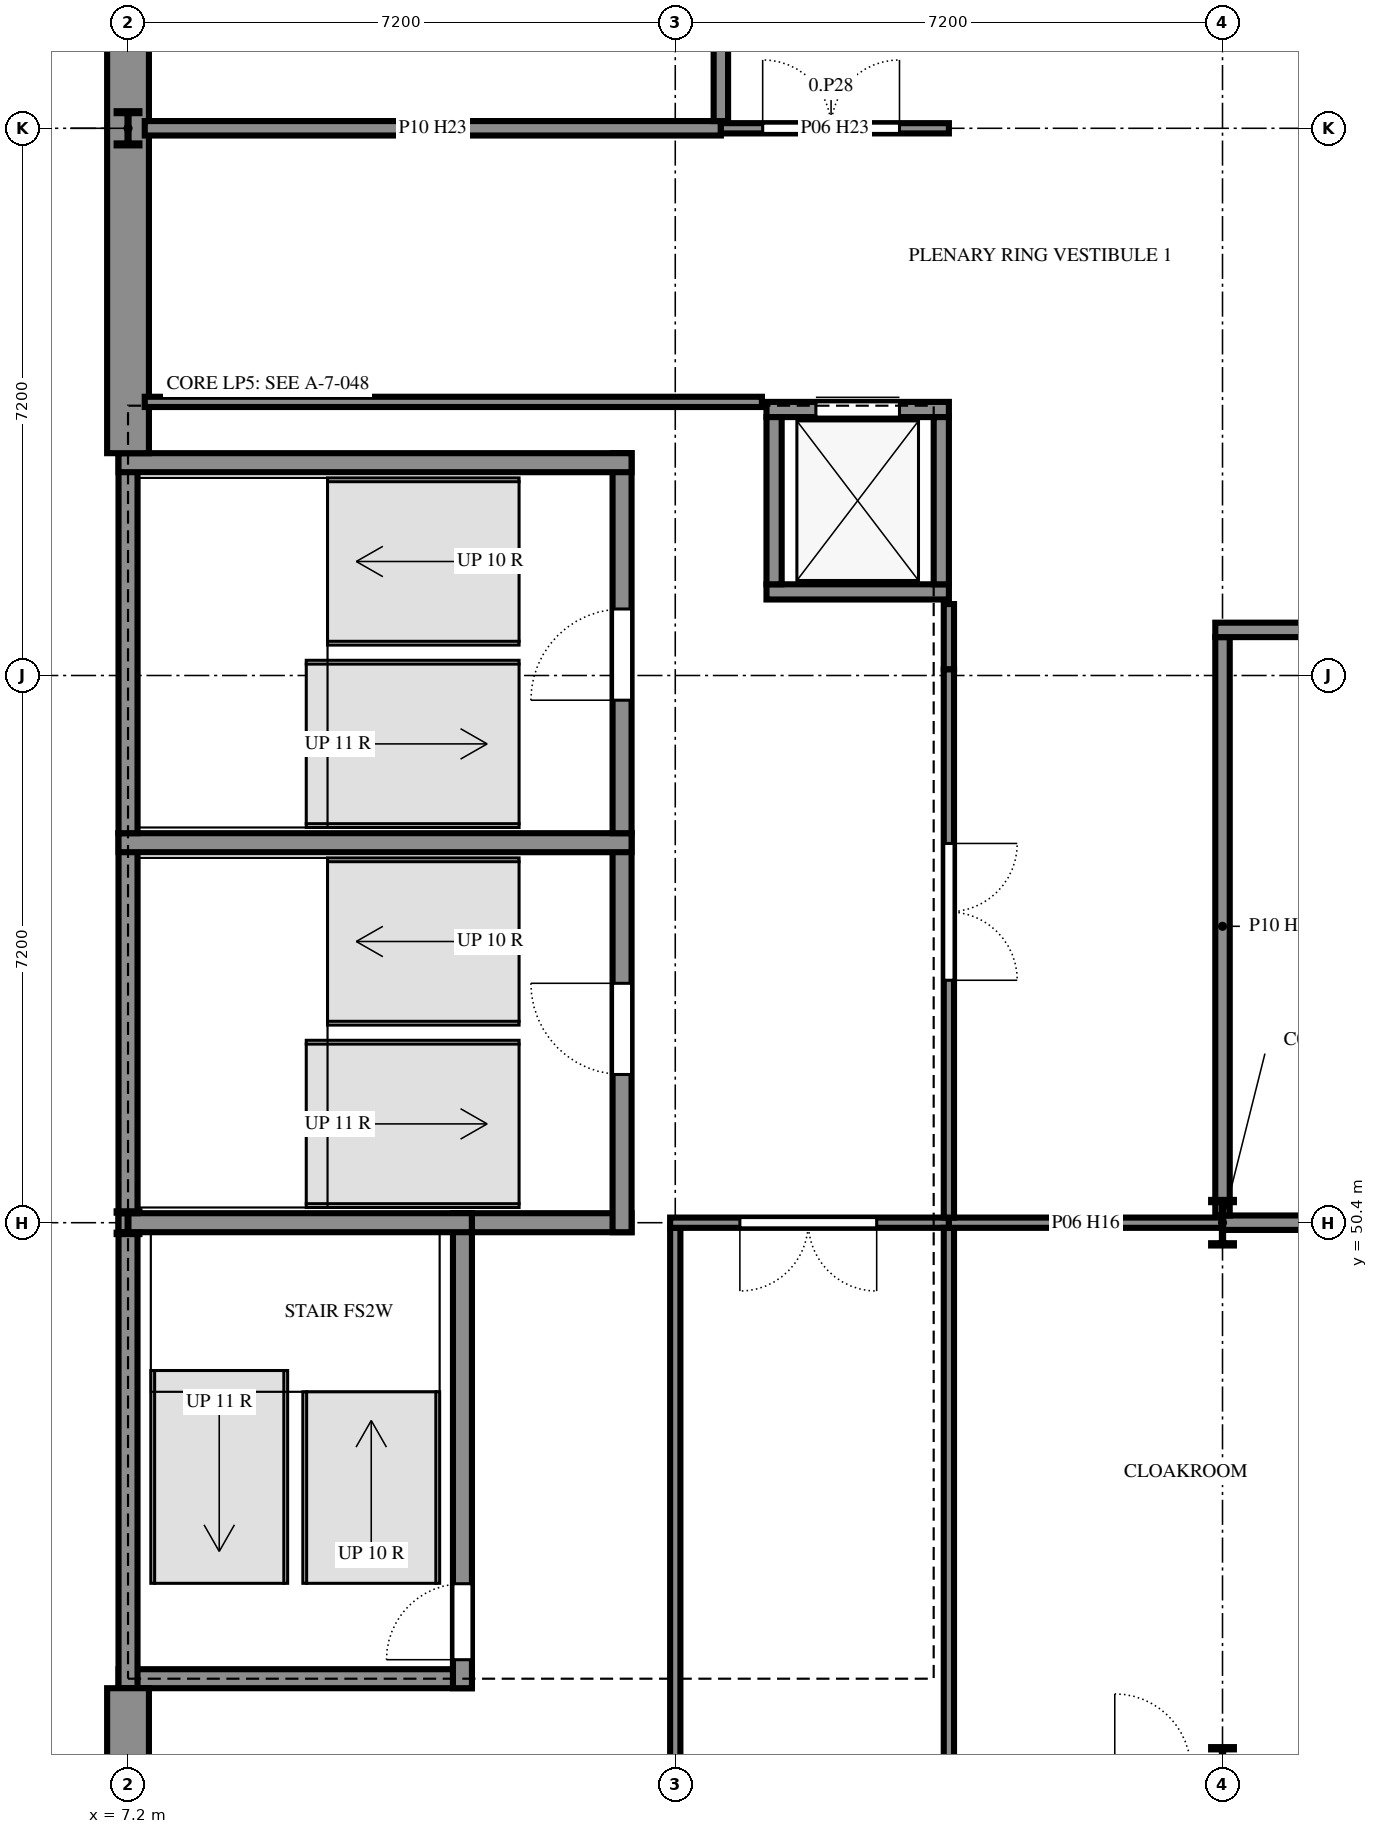
"""IFC4 building model, lengths in metres.
Left out: names, types, materials, properties, quantities, classifications, styles, units other than length and angle.
Written with IfcOpenShell. Run it as: python <this file> out.ifc"""

import sys

from ifc_helpers import new_model, si_unit, direction, frame, frame_2d, origin, origin_2d, place, context, subcontext, project, spatial, rectangle, i_section, extrude, element, fill, save


model = new_model("IFC4")
c1 = context("Model", 3, precision=1e-05, world=origin(), true_north=direction((0.0, 1.0)))
c2 = subcontext(c1, "Body", "Model", "MODEL_VIEW")
j1 = project(units=[si_unit("LENGTHUNIT", "METRE"), si_unit("PLANEANGLEUNIT", "RADIAN")], contexts=[c1])
p1 = place(None, origin())
s1 = spatial("IfcSite", under=j1, at=p1, CompositionType="ELEMENT")
p2 = place(p1, origin())
s2 = spatial("IfcBuilding", under=s1, at=p2, CompositionType="ELEMENT")
p3 = place(p2, origin())
s3 = spatial("IfcBuildingStorey", under=s2, at=p3, CompositionType="ELEMENT", Elevation=0.0)
p4 = place(p3, frame((7.2, 50.4, -0.3), z_axis=(0.0, 0.0, 1.0), x_axis=(1.0, 0.0, 0.0)))
e1 = element("IfcColumn", 1, at=p4, inside=s3, PredefinedType="COLUMN", context=c2, shape_type="SweptSolid", body=[
    extrude(i_section(OverallWidth=0.3, OverallDepth=0.3, WebThickness=0.011, FlangeThickness=0.019, FilletRadius=0.027, at=origin_2d()), origin(), (0.0, 0.0, 1.0), 3.9),
])
for number, where, z_axis, x_axis in (
    (2, (21.6, 43.2, -0.3), (0.0, 0.0, 1.0), (1.0, 0.0, 0.0)),
    (3, (21.6, 50.4, -0.3), (0.0, 0.0, 1.0), (1.0, 0.0, 0.0)),
):
    element("IfcColumn", number, at=place(p3, frame(where, z_axis=z_axis, x_axis=x_axis)), inside=s3, PredefinedType="COLUMN", context=c2, shape_type="SweptSolid", body=[
        extrude(i_section(OverallWidth=0.3, OverallDepth=0.6, WebThickness=0.015, FlangeThickness=0.03, FilletRadius=0.027, at=origin_2d()), origin(), (0.0, 0.0, 1.0), 3.9),
    ])
p5 = place(p3, frame((7.2, 64.8, -0.3), z_axis=(0.0, 0.0, 1.0), x_axis=(1.0, 0.0, 0.0)))
e4 = element("IfcColumn", 4, at=p5, inside=s3, PredefinedType="COLUMN", context=c2, shape_type="SweptSolid", body=[
    extrude(i_section(OverallWidth=0.3, OverallDepth=0.45, WebThickness=0.014, FlangeThickness=0.026, FilletRadius=0.027, at=origin_2d()), origin(), (0.0, 0.0, 1.0), 3.9),
])
p6 = place(p3, frame((7.075, 44.4, 0.0), z_axis=(0.0, 0.0, 1.0), x_axis=(1.0, 0.0, 0.0)))
e5 = element("IfcWall", 5, at=p6, inside=s3, PredefinedType="SHEAR", context=c2, shape_type="SweptSolid", body=[
    extrude(rectangle(XDim=4.65, YDim=0.25, at=frame_2d((2.325, 0.0))), origin(), (0.0, 0.0, 1.0), 3.6),
])
p7 = place(p3, frame((11.6, 44.275, 0.0), z_axis=(0.0, 0.0, 1.0), x_axis=(0.0, 1.0, 0.0)))
e6 = element("IfcWall", 6, at=p7, inside=s3, PredefinedType="SHEAR", context=c2, shape_type="SweptSolid", body=[
    extrude(rectangle(XDim=6.25, YDim=0.25, at=frame_2d((3.125, 0.0))), origin(), (0.0, 0.0, 1.0), 3.6),
])
p8 = place(p7, frame((0.375, 0.0, 0.0)))
e7 = element("IfcOpeningElement", 7, at=p8, cuts=e6, PredefinedType="OPENING", context=c2, shape_type="SweptSolid", body=[
    extrude(rectangle(XDim=1.0, YDim=2.4, at=frame_2d((0.5, 1.2))), frame((0.0, 0.135, 0.0), z_axis=(0.0, -1.0, 0.0), x_axis=(1.0, 0.0, 0.0)), (0.0, 0.0, 1.0), 0.27),
])
p9 = place(p3, frame((7.2, 50.525, 0.0), z_axis=(0.0, 0.0, 1.0), x_axis=(0.0, -1.0, 0.0)))
e8 = element("IfcWall", 8, at=p9, inside=s3, PredefinedType="SHEAR", context=c2, shape_type="SweptSolid", body=[
    extrude(rectangle(XDim=6.25, YDim=0.25, at=frame_2d((3.125, 0.0))), origin(), (0.0, 0.0, 1.0), 3.6),
])
p10 = place(p3, frame((11.725, 50.4, 0.0), z_axis=(0.0, 0.0, 1.0), x_axis=(-1.0, 0.0, 0.0)))
e9 = element("IfcWall", 9, at=p10, inside=s3, PredefinedType="SHEAR", context=c2, shape_type="SweptSolid", body=[
    extrude(rectangle(XDim=4.65, YDim=0.25, at=frame_2d((2.325, 0.0))), origin(), (0.0, 0.0, 1.0), 3.6),
])
p11 = place(p3, frame((11.725, 50.4, 0.0), z_axis=(0.0, 0.0, 1.0), x_axis=(1.0, 0.0, 0.0)))
e10 = element("IfcWall", 10, at=p11, inside=s3, PredefinedType="SHEAR", context=c2, shape_type="SweptSolid", body=[
    extrude(rectangle(XDim=2.1, YDim=0.25, at=frame_2d((1.05, 0.0))), origin(), (0.0, 0.0, 1.0), 3.6),
])
p12 = place(p3, frame((13.7, 50.275, 0.0), z_axis=(0.0, 0.0, 1.0), x_axis=(0.0, 1.0, 0.0)))
e11 = element("IfcWall", 11, at=p12, inside=s3, PredefinedType="SHEAR", context=c2, shape_type="SweptSolid", body=[
    extrude(rectangle(XDim=5.25, YDim=0.25, at=frame_2d((2.625, 0.0))), origin(), (0.0, 0.0, 1.0), 3.6),
])
p13 = place(p12, frame((2.075, 0.0, 0.0)))
e12 = element("IfcOpeningElement", 12, at=p13, cuts=e11, PredefinedType="OPENING", context=c2, shape_type="SweptSolid", body=[
    extrude(rectangle(XDim=1.2, YDim=2.4, at=frame_2d((0.6, 1.2))), frame((0.0, 0.135, 0.0), z_axis=(0.0, -1.0, 0.0), x_axis=(1.0, 0.0, 0.0)), (0.0, 0.0, 1.0), 0.27),
])
p14 = place(p3, frame((7.2, 55.525, 0.0), z_axis=(0.0, 0.0, 1.0), x_axis=(0.0, -1.0, 0.0)))
e13 = element("IfcWall", 13, at=p14, inside=s3, PredefinedType="SHEAR", context=c2, shape_type="SweptSolid", body=[
    extrude(rectangle(XDim=5.0, YDim=0.25, at=frame_2d((2.5, 0.0))), origin(), (0.0, 0.0, 1.0), 3.6),
])
p15 = place(p3, frame((13.825, 55.4, 0.0), z_axis=(0.0, 0.0, 1.0), x_axis=(-1.0, 0.0, 0.0)))
e14 = element("IfcWall", 14, at=p15, inside=s3, PredefinedType="SHEAR", context=c2, shape_type="SweptSolid", body=[
    extrude(rectangle(XDim=6.75, YDim=0.25, at=frame_2d((3.375, 0.0))), origin(), (0.0, 0.0, 1.0), 3.6),
])
p16 = place(p3, frame((13.7, 55.525, 0.0), z_axis=(0.0, 0.0, 1.0), x_axis=(0.0, 1.0, 0.0)))
e15 = element("IfcWall", 15, at=p16, inside=s3, PredefinedType="SHEAR", context=c2, shape_type="SweptSolid", body=[
    extrude(rectangle(XDim=5.0, YDim=0.25, at=frame_2d((2.5, 0.0))), origin(), (0.0, 0.0, 1.0), 3.6),
])
p17 = place(p16, frame((1.75, 0.0, 0.0)))
e16 = element("IfcOpeningElement", 16, at=p17, cuts=e15, PredefinedType="OPENING", context=c2, shape_type="SweptSolid", body=[
    extrude(rectangle(XDim=1.2, YDim=2.4, at=frame_2d((0.6, 1.2))), frame((0.0, 0.135, 0.0), z_axis=(0.0, -1.0, 0.0), x_axis=(1.0, 0.0, 0.0)), (0.0, 0.0, 1.0), 0.27),
])
p18 = place(p3, frame((7.2, 60.525, 0.0), z_axis=(0.0, 0.0, 1.0), x_axis=(0.0, -1.0, 0.0)))
e17 = element("IfcWall", 17, at=p18, inside=s3, PredefinedType="SHEAR", context=c2, shape_type="SweptSolid", body=[
    extrude(rectangle(XDim=5.0, YDim=0.25, at=frame_2d((2.5, 0.0))), origin(), (0.0, 0.0, 1.0), 3.6),
])
p19 = place(p3, frame((13.825, 60.4, 0.0), z_axis=(0.0, 0.0, 1.0), x_axis=(-1.0, 0.0, 0.0)))
e18 = element("IfcWall", 18, at=p19, inside=s3, PredefinedType="SHEAR", context=c2, shape_type="SweptSolid", body=[
    extrude(rectangle(XDim=6.75, YDim=0.25, at=frame_2d((3.375, 0.0))), origin(), (0.0, 0.0, 1.0), 3.6),
])
p20 = place(p3, frame((7.2, 41.75, 0.0), z_axis=(0.0, 0.0, 1.0), x_axis=(0.0, 1.0, 0.0)))
e19 = element("IfcWall", 19, at=p20, inside=s3, PredefinedType="SOLIDWALL", context=c2, shape_type="SweptSolid", body=[
    extrude(rectangle(XDim=2.525, YDim=0.55, at=frame_2d((1.262, 0.0))), origin(), (0.0, 0.0, 1.0), 3.6),
])
p21 = place(p3, frame((7.2, 60.525, 0.0), z_axis=(0.0, 0.0, 1.0), x_axis=(0.0, 1.0, 0.0)))
e20 = element("IfcWall", 20, at=p21, inside=s3, PredefinedType="SOLIDWALL", context=c2, shape_type="SweptSolid", body=[
    extrude(rectangle(XDim=55.25, YDim=0.55, at=frame_2d((27.625, 0.0))), origin(), (0.0, 0.0, 1.0), 3.6),
])
p22 = place(p3, frame((15.6, 58.7, -1.4), z_axis=(0.0, 0.0, 1.0), x_axis=(1.0, 0.0, 0.0)))
e21 = element("IfcWall", 21, at=p22, inside=s3, PredefinedType="SHEAR", context=c2, shape_type="SweptSolid", body=[
    extrude(rectangle(XDim=2.4, YDim=0.2, at=frame_2d((1.2, 0.0))), origin(), (0.0, 0.0, 1.0), 5.0),
])
p23 = place(p3, frame((15.6, 61.1, -1.4), z_axis=(0.0, 0.0, 1.0), x_axis=(1.0, 0.0, 0.0)))
e22 = element("IfcWall", 22, at=p23, inside=s3, PredefinedType="SHEAR", context=c2, shape_type="SweptSolid", body=[
    extrude(rectangle(XDim=2.4, YDim=0.2, at=frame_2d((1.2, 0.0))), origin(), (0.0, 0.0, 1.0), 5.0),
])
p24 = place(p23, frame((0.65, 0.0, 1.4)))
e23 = element("IfcOpeningElement", 23, at=p24, cuts=e22, PredefinedType="OPENING", context=c2, shape_type="SweptSolid", body=[
    extrude(rectangle(XDim=1.1, YDim=2.1, at=frame_2d((0.55, 1.05))), frame((0.0, 0.11, 0.0), z_axis=(0.0, -1.0, 0.0), x_axis=(1.0, 0.0, 0.0)), (0.0, 0.0, 1.0), 0.22),
])
for number, where, z_axis, x_axis in (
    (24, (15.7, 58.8, -1.4), (0.0, 0.0, 1.0), (0.0, 1.0, 0.0)),
    (25, (17.9, 58.8, -1.4), (0.0, 0.0, 1.0), (0.0, 1.0, 0.0)),
):
    element("IfcWall", number, at=place(p3, frame(where, z_axis=z_axis, x_axis=x_axis)), inside=s3, PredefinedType="SHEAR", context=c2, shape_type="SweptSolid", body=[
        extrude(rectangle(XDim=2.2, YDim=0.2, at=frame_2d((1.1, 0.0))), origin(), (0.0, 0.0, 1.0), 5.0),
    ])
p25 = place(p3, frame((14.4, 50.333, 0.0), z_axis=(0.0, 0.0, 1.0), x_axis=(0.0, -1.0, 0.0)))
e26 = element("IfcWall", 26, at=p25, inside=s3, PredefinedType="PARTITIONING", context=c2, shape_type="SweptSolid", body=[
    extrude(rectangle(XDim=14.443, YDim=0.135, at=frame_2d((7.221, 0.0))), origin(), (0.0, 0.0, 1.0), 3.12),
])
p26 = place(p25, frame((9.45, 0.0, 0.0)))
e27 = element("IfcOpeningElement", 27, at=p26, cuts=e26, PredefinedType="OPENING", context=c2, shape_type="SweptSolid", body=[
    extrude(rectangle(XDim=1.8, YDim=2.4, at=frame_2d((0.9, 1.2))), frame((0.0, 0.077, 0.0), z_axis=(0.0, -1.0, 0.0), x_axis=(1.0, 0.0, 0.0)), (0.0, 0.0, 1.0), 0.155),
])
p27 = place(p3, frame((18.0, 50.4, 0.0), z_axis=(0.0, 0.0, 1.0), x_axis=(-1.0, 0.0, 0.0)))
e28 = element("IfcWall", 28, at=p27, inside=s3, PredefinedType="PARTITIONING", context=c2, shape_type="SweptSolid", body=[
    extrude(rectangle(XDim=3.667, YDim=0.135, at=frame_2d((1.834, 0.0))), origin(), (0.0, 0.0, 1.0), 3.09),
])
p28 = place(p27, frame((0.95, 0.0, 0.0)))
e29 = element("IfcOpeningElement", 29, at=p28, cuts=e28, PredefinedType="OPENING", context=c2, shape_type="SweptSolid", body=[
    extrude(rectangle(XDim=1.8, YDim=2.4, at=frame_2d((0.9, 1.2))), frame((0.0, 0.077, 0.0), z_axis=(0.0, -1.0, 0.0), x_axis=(1.0, 0.0, 0.0)), (0.0, 0.0, 1.0), 0.155),
])
p29 = place(p3, frame((18.0, 58.54, 0.0), z_axis=(0.0, 0.0, 1.0), x_axis=(0.0, -1.0, 0.0)))
e30 = element("IfcWall", 30, at=p29, inside=s3, PredefinedType="PARTITIONING", context=c2, shape_type="SweptSolid", body=[
    extrude(rectangle(XDim=0.86, YDim=0.135, at=frame_2d((0.43, 0.0))), origin(), (0.0, 0.0, 1.0), 3.21),
])
p30 = place(p3, frame((7.42, 61.2, 0.0), z_axis=(0.0, 0.0, 1.0), x_axis=(1.0, 0.0, 0.0)))
e31 = element("IfcWall", 31, at=p30, inside=s3, PredefinedType="PARTITIONING", context=c2, shape_type="SweptSolid", body=[
    extrude(rectangle(XDim=8.12, YDim=0.135, at=frame_2d((4.06, 0.0))), origin(), (0.0, 0.0, 1.0), 3.42),
])
p31 = place(p3, frame((18.0, 50.333, 0.0), z_axis=(0.0, 0.0, 1.0), x_axis=(0.0, -1.0, 0.0)))
e32 = element("IfcWall", 32, at=p31, inside=s3, PredefinedType="PARTITIONING", context=c2, shape_type="SweptSolid", body=[
    extrude(rectangle(XDim=7.065, YDim=0.135, at=frame_2d((3.532, 0.0))), origin(), (0.0, 0.0, 1.0), 3.12),
])
p32 = place(p3, frame((21.6, 50.4, 0.0), z_axis=(0.0, 0.0, 1.0), x_axis=(1.0, 0.0, 0.0)))
e33 = element("IfcWall", 33, at=p32, inside=s3, PredefinedType="PARTITIONING", context=c2, shape_type="SweptSolid", body=[
    extrude(rectangle(XDim=3.6, YDim=0.19, at=frame_2d((1.8, 0.0))), origin(), (0.0, 0.0, 1.0), 2.82),
])
p33 = place(p3, frame((18.0, 50.4, 0.0), z_axis=(0.0, 0.0, 1.0), x_axis=(1.0, 0.0, 0.0)))
e34 = element("IfcWall", 34, at=p33, inside=s3, PredefinedType="PARTITIONING", context=c2, shape_type="SweptSolid", body=[
    extrude(rectangle(XDim=3.6, YDim=0.135, at=frame_2d((1.8, 0.0))), origin(), (0.0, 0.0, 1.0), 3.09),
])
p34 = place(p3, frame((15.0, 64.8, 0.0), z_axis=(0.0, 0.0, 1.0), x_axis=(-1.0, 0.0, 0.0)))
e35 = element("IfcWall", 35, at=p34, inside=s3, PredefinedType="PARTITIONING", context=c2, shape_type="SweptSolid", body=[
    extrude(rectangle(XDim=7.58, YDim=0.19, at=frame_2d((3.79, 0.0))), origin(), (0.0, 0.0, 1.0), 2.81),
])
p35 = place(p3, frame((15.0, 86.305, 0.0), z_axis=(0.0, 0.0, 1.0), x_axis=(0.0, -1.0, 0.0)))
e36 = element("IfcWall", 36, at=p35, inside=s3, PredefinedType="PARTITIONING", context=c2, shape_type="SweptSolid", body=[
    extrude(rectangle(XDim=21.41, YDim=0.19, at=frame_2d((10.705, 0.0))), origin(), (0.0, 0.0, 1.0), 3.42),
])
p36 = place(p35, frame((9.95, 0.0, 0.0)))
e37 = element("IfcOpeningElement", 37, at=p36, cuts=e36, PredefinedType="OPENING", context=c2, shape_type="SweptSolid", body=[
    extrude(rectangle(XDim=1.5, YDim=2.1, at=frame_2d((0.75, 1.05))), frame((0.0, 0.105, 0.0), z_axis=(0.0, -1.0, 0.0), x_axis=(1.0, 0.0, 0.0)), (0.0, 0.0, 1.0), 0.21),
])
p37 = place(p3, frame((21.6, 50.495, 0.0), z_axis=(0.0, 0.0, 1.0), x_axis=(0.0, 1.0, 0.0)))
e38 = element("IfcWall", 38, at=p37, inside=s3, PredefinedType="PARTITIONING", context=c2, shape_type="SweptSolid", body=[
    extrude(rectangle(XDim=7.61, YDim=0.19, at=frame_2d((3.805, 0.0))), origin(), (0.0, 0.0, 1.0), 2.41),
])
p38 = place(p3, frame((21.505, 58.2, 0.0), z_axis=(0.0, 0.0, 1.0), x_axis=(1.0, 0.0, 0.0)))
e39 = element("IfcWall", 39, at=p38, inside=s3, PredefinedType="PARTITIONING", context=c2, shape_type="SweptSolid", body=[
    extrude(rectangle(XDim=9.095, YDim=0.19, at=frame_2d((4.548, 0.0))), origin(), (0.0, 0.0, 1.0), 3.42),
])
p39 = place(p38, frame((4.05, 0.0, 0.0)))
e40 = element("IfcOpeningElement", 40, at=p39, cuts=e39, PredefinedType="OPENING", context=c2, shape_type="SweptSolid", body=[
    extrude(rectangle(XDim=1.0, YDim=2.4, at=frame_2d((0.5, 1.2))), frame((0.0, 0.105, 0.0), z_axis=(0.0, -1.0, 0.0), x_axis=(1.0, 0.0, 0.0)), (0.0, 0.0, 1.0), 0.21),
])
p40 = place(p3, frame((15.0, 64.8, 0.0), z_axis=(0.0, 0.0, 1.0), x_axis=(1.0, 0.0, 0.0)))
e41 = element("IfcWall", 41, at=p40, inside=s3, PredefinedType="PARTITIONING", context=c2, shape_type="SweptSolid", body=[
    extrude(rectangle(XDim=3.0, YDim=0.135, at=frame_2d((1.5, 0.0))), origin(), (0.0, 0.0, 1.0), 2.81),
])
p41 = place(p40, frame((0.55, 0.0, 0.0)))
e42 = element("IfcOpeningElement", 42, at=p41, cuts=e41, PredefinedType="OPENING", context=c2, shape_type="SweptSolid", body=[
    extrude(rectangle(XDim=1.8, YDim=2.4, at=frame_2d((0.9, 1.2))), frame((0.0, 0.077, 0.0), z_axis=(0.0, -1.0, 0.0), x_axis=(1.0, 0.0, 0.0)), (0.0, 0.0, 1.0), 0.155),
])
p42 = place(p3, frame((18.0, 57.68, 0.0), z_axis=(0.0, 0.0, 1.0), x_axis=(0.0, -1.0, 0.0)))
e43 = element("IfcWall", 43, at=p42, inside=s3, PredefinedType="PARTITIONING", context=c2, shape_type="SweptSolid", body=[
    extrude(rectangle(XDim=7.212, YDim=0.135, at=frame_2d((3.606, 0.0))), origin(), (0.0, 0.0, 1.0), 3.11),
])
p43 = place(p42, frame((2.29, 0.0, 0.0)))
e44 = element("IfcOpeningElement", 44, at=p43, cuts=e43, PredefinedType="OPENING", context=c2, shape_type="SweptSolid", body=[
    extrude(rectangle(XDim=1.8, YDim=2.4, at=frame_2d((0.9, 1.2))), frame((0.0, 0.077, 0.0), z_axis=(0.0, -1.0, 0.0), x_axis=(1.0, 0.0, 0.0)), (0.0, 0.0, 1.0), 0.155),
])
p44 = place(p24, origin())
e45 = element("IfcDoor", 45, at=p44, inside=s3, OperationType="SLIDING_TO_LEFT", PredefinedType="DOOR", context=c2, shape_type="SweptSolid", body=[
    extrude(rectangle(XDim=1.1, YDim=2.1, at=frame_2d((0.55, 1.05))), frame((0.0, 0.025, 0.0), z_axis=(0.0, -1.0, 0.0), x_axis=(1.0, 0.0, 0.0)), (0.0, 0.0, 1.0), 0.05),
])
fill(e23, e45)
p45 = place(p8, origin())
e46 = element("IfcDoor", 46, at=p45, inside=s3, OperationType="SINGLE_SWING_RIGHT", PredefinedType="DOOR", context=c2, shape_type="SweptSolid", body=[
    extrude(rectangle(XDim=1.0, YDim=2.4, at=frame_2d((0.5, 1.2))), frame((0.0, 0.025, 0.0), z_axis=(0.0, -1.0, 0.0), x_axis=(1.0, 0.0, 0.0)), (0.0, 0.0, 1.0), 0.05),
])
fill(e7, e46)
p46 = place(p13, origin())
e47 = element("IfcDoor", 47, at=p46, inside=s3, OperationType="SINGLE_SWING_LEFT", PredefinedType="DOOR", context=c2, shape_type="SweptSolid", body=[
    extrude(rectangle(XDim=1.2, YDim=2.4, at=frame_2d((0.6, 1.2))), frame((0.0, 0.025, 0.0), z_axis=(0.0, -1.0, 0.0), x_axis=(1.0, 0.0, 0.0)), (0.0, 0.0, 1.0), 0.05),
])
fill(e12, e47)
p47 = place(p17, origin())
e48 = element("IfcDoor", 48, at=p47, inside=s3, OperationType="SINGLE_SWING_RIGHT", PredefinedType="DOOR", context=c2, shape_type="SweptSolid", body=[
    extrude(rectangle(XDim=1.2, YDim=2.4, at=frame_2d((0.6, 1.2))), frame((0.0, 0.025, 0.0), z_axis=(0.0, -1.0, 0.0), x_axis=(1.0, 0.0, 0.0)), (0.0, 0.0, 1.0), 0.05),
])
fill(e16, e48)
p48 = place(p28, origin())
e49 = element("IfcDoor", 49, at=p48, inside=s3, OperationType="DOUBLE_DOOR_SINGLE_SWING", PredefinedType="DOOR", context=c2, shape_type="SweptSolid", body=[
    extrude(rectangle(XDim=1.8, YDim=2.4, at=frame_2d((0.9, 1.2))), frame((0.0, 0.025, 0.0), z_axis=(0.0, -1.0, 0.0), x_axis=(1.0, 0.0, 0.0)), (0.0, 0.0, 1.0), 0.05),
])
fill(e29, e49)
p49 = place(p41, origin())
e50 = element("IfcDoor", 50, at=p49, inside=s3, OperationType="DOUBLE_DOOR_SINGLE_SWING", PredefinedType="DOOR", context=c2, shape_type="SweptSolid", body=[
    extrude(rectangle(XDim=1.8, YDim=2.4, at=frame_2d((0.9, 1.2))), frame((0.0, 0.025, 0.0), z_axis=(0.0, -1.0, 0.0), x_axis=(1.0, 0.0, 0.0)), (0.0, 0.0, 1.0), 0.05),
])
fill(e42, e50)
p50 = place(p43, origin())
e51 = element("IfcDoor", 51, at=p50, inside=s3, OperationType="DOUBLE_DOOR_SINGLE_SWING", PredefinedType="DOOR", context=c2, shape_type="SweptSolid", body=[
    extrude(rectangle(XDim=1.8, YDim=2.4, at=frame_2d((0.9, 1.2))), frame((0.0, 0.025, 0.0), z_axis=(0.0, -1.0, 0.0), x_axis=(1.0, 0.0, 0.0)), (0.0, 0.0, 1.0), 0.05),
])
fill(e44, e51)
save(model, sys.argv[1])
